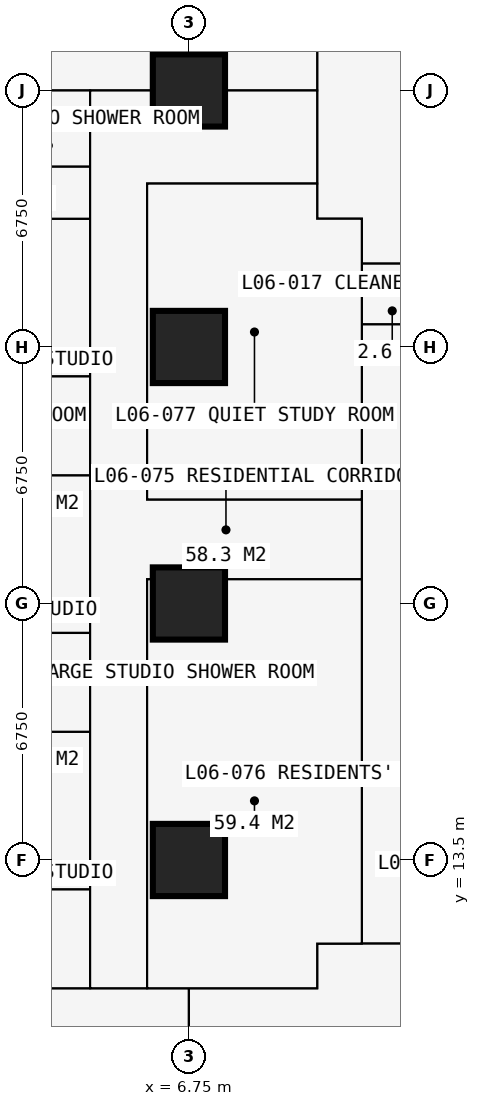
"""IFC4 building model, lengths in metres.
Left out: names, types, materials, properties, quantities, classifications, styles, units other than length and angle.
Written with IfcOpenShell. Run it as: python <this file> out.ifc"""

import sys

from ifc_helpers import new_model, si_unit, direction, frame, frame_2d, origin, origin_2d, place, context, subcontext, project, spatial, rectangle, extrude, element, fill, save


model = new_model("IFC4")
c1 = context("Model", 3, precision=1e-05, world=origin(), true_north=direction((0.0, 1.0)))
c2 = subcontext(c1, "Body", "Model", "MODEL_VIEW")
j1 = project(units=[si_unit("LENGTHUNIT", "METRE"), si_unit("PLANEANGLEUNIT", "RADIAN")], contexts=[c1])
p1 = place(None, origin())
s1 = spatial("IfcSite", under=j1, at=p1, CompositionType="ELEMENT")
p2 = place(p1, origin())
s2 = spatial("IfcBuilding", under=s1, at=p2, CompositionType="ELEMENT")
p3 = place(p2, frame((0.0, 0.0, 25.2)))
s3 = spatial("IfcBuildingStorey", under=s2, at=p3, CompositionType="ELEMENT", Elevation=25.2)
for number, where, z_axis, x_axis in (
    (1, (6.75, 13.5, 0.0), (0.0, 0.0, 1.0), (1.0, 0.0, 0.0)),
    (2, (6.75, 20.25, 0.0), (0.0, 0.0, 1.0), (1.0, 0.0, 0.0)),
    (3, (6.75, 27.0, 0.0), (0.0, 0.0, 1.0), (1.0, 0.0, 0.0)),
    (4, (6.75, 33.75, 0.0), (0.0, 0.0, 1.0), (1.0, 0.0, 0.0)),
):
    element("IfcColumn", number, at=place(p3, frame(where, z_axis=z_axis, x_axis=x_axis)), inside=s3, PredefinedType="COLUMN", context=c2, shape_type="SweptSolid", body=[
        extrude(rectangle(XDim=1.9, YDim=1.9, at=origin_2d()), origin(), (0.0, 0.0, 1.0), 3.6),
    ])
p4 = place(p3, frame((-0.734, 10.125, 0.0), z_axis=(0.0, 0.0, 1.0), x_axis=(1.0, 0.0, 0.0)))
e5 = element("IfcWall", 5, at=p4, inside=s3, PredefinedType="PARTITIONING", context=c2, shape_type="SweptSolid", body=[
    extrude(rectangle(XDim=10.859, YDim=0.15, at=frame_2d((5.429, 0.0))), origin(), (0.0, 0.0, 1.0), 3.375),
])
p5 = place(p4, frame((5.134, 0.0, 0.0)))
e6 = element("IfcOpeningElement", 6, at=p5, cuts=e5, PredefinedType="OPENING", context=c2, shape_type="SweptSolid", body=[
    extrude(rectangle(XDim=1.0, YDim=2.2, at=frame_2d((0.5, 1.1))), frame((0.0, 0.085, 0.0), z_axis=(0.0, -1.0, 0.0), x_axis=(1.0, 0.0, 0.0)), (0.0, 0.0, 1.0), 0.17),
])
p6 = place(p3, frame((-0.734, 16.875, 0.0), z_axis=(0.0, 0.0, 1.0), x_axis=(1.0, 0.0, 0.0)))
e7 = element("IfcWall", 7, at=p6, inside=s3, PredefinedType="PARTITIONING", context=c2, shape_type="SweptSolid", body=[
    extrude(rectangle(XDim=4.884, YDim=0.175, at=frame_2d((2.442, 0.0))), origin(), (0.0, 0.0, 1.0), 3.375),
])
p7 = place(p6, frame((3.234, 0.0, 0.0)))
e8 = element("IfcOpeningElement", 8, at=p7, cuts=e7, PredefinedType="OPENING", context=c2, shape_type="SweptSolid", body=[
    extrude(rectangle(XDim=0.9, YDim=2.2, at=frame_2d((0.45, 1.1))), frame((0.0, 0.097, 0.0), z_axis=(0.0, -1.0, 0.0), x_axis=(1.0, 0.0, 0.0)), (0.0, 0.0, 1.0), 0.195),
])
p8 = place(p3, frame((-0.734, 23.625, 0.0), z_axis=(0.0, 0.0, 1.0), x_axis=(1.0, 0.0, 0.0)))
e9 = element("IfcWall", 9, at=p8, inside=s3, PredefinedType="PARTITIONING", context=c2, shape_type="SweptSolid", body=[
    extrude(rectangle(XDim=4.884, YDim=0.175, at=frame_2d((2.442, 0.0))), origin(), (0.0, 0.0, 1.0), 3.375),
])
p9 = place(p8, frame((3.234, 0.0, 0.0)))
e10 = element("IfcOpeningElement", 10, at=p9, cuts=e9, PredefinedType="OPENING", context=c2, shape_type="SweptSolid", body=[
    extrude(rectangle(XDim=0.9, YDim=2.2, at=frame_2d((0.45, 1.1))), frame((0.0, 0.097, 0.0), z_axis=(0.0, -1.0, 0.0), x_axis=(1.0, 0.0, 0.0)), (0.0, 0.0, 1.0), 0.195),
])
p10 = place(p3, frame((-0.734, 30.375, 0.0), z_axis=(0.0, 0.0, 1.0), x_axis=(1.0, 0.0, 0.0)))
e11 = element("IfcWall", 11, at=p10, inside=s3, PredefinedType="PARTITIONING", context=c2, shape_type="SweptSolid", body=[
    extrude(rectangle(XDim=4.884, YDim=0.175, at=frame_2d((2.442, 0.0))), origin(), (0.0, 0.0, 1.0), 3.375),
])
p11 = place(p3, frame((-0.734, 33.75, 0.0), z_axis=(0.0, 0.0, 1.0), x_axis=(1.0, 0.0, 0.0)))
e12 = element("IfcWall", 12, at=p11, inside=s3, PredefinedType="PARTITIONING", context=c2, shape_type="SweptSolid", body=[
    extrude(rectangle(XDim=10.859, YDim=0.15, at=frame_2d((5.429, 0.0))), origin(), (0.0, 0.0, 1.0), 2.877),
])
for number, where, z_axis, x_axis in (
    (13, (1.75, 12.725, 0.0), (0.0, 0.0, 1.0), (1.0, 0.0, 0.0)),
    (14, (1.75, 19.475, 0.0), (0.0, 0.0, 1.0), (1.0, 0.0, 0.0)),
    (15, (1.75, 26.225, 0.0), (0.0, 0.0, 1.0), (1.0, 0.0, 0.0)),
):
    element("IfcWall", number, at=place(p3, frame(where, z_axis=z_axis, x_axis=x_axis)), inside=s3, PredefinedType="PARTITIONING", context=c2, shape_type="SweptSolid", body=[
        extrude(rectangle(XDim=2.4, YDim=0.1, at=frame_2d((1.2, 0.0))), origin(), (0.0, 0.0, 1.0), 3.375),
    ])
p12 = place(p3, frame((1.95, 31.75, 0.0), z_axis=(0.0, 0.0, 1.0), x_axis=(1.0, 0.0, 0.0)))
e16 = element("IfcWall", 16, at=p12, inside=s3, PredefinedType="PARTITIONING", context=c2, shape_type="SweptSolid", body=[
    extrude(rectangle(XDim=2.2, YDim=0.1, at=frame_2d((1.1, 0.0))), origin(), (0.0, 0.0, 1.0), 3.375),
])
p13 = place(p12, frame((0.65, 0.0, 0.0)))
e17 = element("IfcOpeningElement", 17, at=p13, cuts=e16, PredefinedType="OPENING", context=c2, shape_type="SweptSolid", body=[
    extrude(rectangle(XDim=0.9, YDim=2.2, at=frame_2d((0.45, 1.1))), frame((0.0, 0.06, 0.0), z_axis=(0.0, -1.0, 0.0), x_axis=(1.0, 0.0, 0.0)), (0.0, 0.0, 1.0), 0.12),
])
p14 = place(p3, frame((4.15, 10.125, 0.0), z_axis=(0.0, 0.0, 1.0), x_axis=(0.0, 1.0, 0.0)))
e18 = element("IfcWall", 18, at=p14, inside=s3, PredefinedType="PARTITIONING", context=c2, shape_type="SweptSolid", body=[
    extrude(rectangle(XDim=23.625, YDim=0.15, at=frame_2d((11.812, 0.0))), origin(), (0.0, 0.0, 1.0), 3.375),
])
p15 = place(p14, frame((4.2, 0.0, 0.0)))
e19 = element("IfcOpeningElement", 19, at=p15, cuts=e18, PredefinedType="OPENING", context=c2, shape_type="SweptSolid", body=[
    extrude(rectangle(XDim=0.95, YDim=2.2, at=frame_2d((0.475, 1.1))), frame((0.0, 0.085, 0.0), z_axis=(0.0, -1.0, 0.0), x_axis=(1.0, 0.0, 0.0)), (0.0, 0.0, 1.0), 0.17),
])
p16 = place(p14, frame((10.95, 0.0, 0.0)))
e20 = element("IfcOpeningElement", 20, at=p16, cuts=e18, PredefinedType="OPENING", context=c2, shape_type="SweptSolid", body=[
    extrude(rectangle(XDim=0.95, YDim=2.2, at=frame_2d((0.475, 1.1))), frame((0.0, 0.085, 0.0), z_axis=(0.0, -1.0, 0.0), x_axis=(1.0, 0.0, 0.0)), (0.0, 0.0, 1.0), 0.17),
])
p17 = place(p14, frame((17.7, 0.0, 0.0)))
e21 = element("IfcOpeningElement", 21, at=p17, cuts=e18, PredefinedType="OPENING", context=c2, shape_type="SweptSolid", body=[
    extrude(rectangle(XDim=0.95, YDim=2.2, at=frame_2d((0.475, 1.1))), frame((0.0, 0.085, 0.0), z_axis=(0.0, -1.0, 0.0), x_axis=(1.0, 0.0, 0.0)), (0.0, 0.0, 1.0), 0.17),
])
p18 = place(p14, frame((20.5, 0.0, 0.0)))
e22 = element("IfcOpeningElement", 22, at=p18, cuts=e18, PredefinedType="OPENING", context=c2, shape_type="SweptSolid", body=[
    extrude(rectangle(XDim=0.95, YDim=2.2, at=frame_2d((0.475, 1.1))), frame((0.0, 0.085, 0.0), z_axis=(0.0, -1.0, 0.0), x_axis=(1.0, 0.0, 0.0)), (0.0, 0.0, 1.0), 0.17),
])
p19 = place(p3, frame((5.65, 10.125, 0.0), z_axis=(0.0, 0.0, 1.0), x_axis=(0.0, 1.0, 0.0)))
e23 = element("IfcWall", 23, at=p19, inside=s3, PredefinedType="PARTITIONING", context=c2, shape_type="SweptSolid", body=[
    extrude(rectangle(XDim=10.762, YDim=0.15, at=frame_2d((5.381, 0.0))), origin(), (0.0, 0.0, 1.0), 3.375),
])
p20 = place(p19, frame((4.9, 0.0, 0.0)))
e24 = element("IfcOpeningElement", 24, at=p20, cuts=e23, PredefinedType="OPENING", context=c2, shape_type="SweptSolid", body=[
    extrude(rectangle(XDim=0.95, YDim=2.2, at=frame_2d((0.475, 1.1))), frame((0.0, 0.085, 0.0), z_axis=(0.0, -1.0, 0.0), x_axis=(1.0, 0.0, 0.0)), (0.0, 0.0, 1.0), 0.17),
])
p21 = place(p3, frame((5.65, 20.887, 0.0), z_axis=(0.0, 0.0, 1.0), x_axis=(1.0, 0.0, 0.0)))
e25 = element("IfcWall", 25, at=p21, inside=s3, PredefinedType="PARTITIONING", context=c2, shape_type="SweptSolid", body=[
    extrude(rectangle(XDim=5.65, YDim=0.15, at=frame_2d((2.825, 0.0))), origin(), (0.0, 0.0, 1.0), 3.375),
])
p22 = place(p3, frame((5.65, 22.988, 0.0), z_axis=(0.0, 0.0, 1.0), x_axis=(0.0, 1.0, 0.0)))
e26 = element("IfcWall", 26, at=p22, inside=s3, PredefinedType="PARTITIONING", context=c2, shape_type="SweptSolid", body=[
    extrude(rectangle(XDim=8.312, YDim=0.15, at=frame_2d((4.156, 0.0))), origin(), (0.0, 0.0, 1.0), 3.375),
])
p23 = place(p22, frame((5.0, 0.0, 0.0)))
e27 = element("IfcOpeningElement", 27, at=p23, cuts=e26, PredefinedType="OPENING", context=c2, shape_type="SweptSolid", body=[
    extrude(rectangle(XDim=0.95, YDim=2.2, at=frame_2d((0.475, 1.1))), frame((0.0, 0.085, 0.0), z_axis=(0.0, -1.0, 0.0), x_axis=(1.0, 0.0, 0.0)), (0.0, 0.0, 1.0), 0.17),
])
p24 = place(p3, frame((5.65, 22.988, 0.0), z_axis=(0.0, 0.0, 1.0), x_axis=(1.0, 0.0, 0.0)))
e28 = element("IfcWall", 28, at=p24, inside=s3, PredefinedType="PARTITIONING", context=c2, shape_type="SweptSolid", body=[
    extrude(rectangle(XDim=5.65, YDim=0.15, at=frame_2d((2.825, 0.0))), origin(), (0.0, 0.0, 1.0), 3.375),
])
p25 = place(p3, frame((5.65, 31.3, 0.0), z_axis=(0.0, 0.0, 1.0), x_axis=(1.0, 0.0, 0.0)))
e29 = element("IfcWall", 29, at=p25, inside=s3, PredefinedType="PARTITIONING", context=c2, shape_type="SweptSolid", body=[
    extrude(rectangle(XDim=4.475, YDim=0.15, at=frame_2d((2.238, 0.0))), origin(), (0.0, 0.0, 1.0), 3.375),
])
p26 = place(p3, frame((6.75, -0.734, 0.0), z_axis=(0.0, 0.0, 1.0), x_axis=(0.0, 1.0, 0.0)))
e30 = element("IfcWall", 30, at=p26, inside=s3, PredefinedType="PARTITIONING", context=c2, shape_type="SweptSolid", body=[
    extrude(rectangle(XDim=10.859, YDim=0.15, at=frame_2d((5.429, 0.0))), origin(), (0.0, 0.0, 1.0), 2.877),
])
p27 = place(p3, frame((10.125, 10.125, 0.0), z_axis=(0.0, 0.0, 1.0), x_axis=(0.0, 1.0, 0.0)))
e31 = element("IfcWall", 31, at=p27, inside=s3, PredefinedType="PARTITIONING", context=c2, shape_type="SweptSolid", body=[
    extrude(rectangle(XDim=1.175, YDim=0.15, at=frame_2d((0.587, 0.0))), origin(), (0.0, 0.0, 1.0), 3.375),
])
p28 = place(p3, frame((10.125, 11.3, 0.0), z_axis=(0.0, 0.0, 1.0), x_axis=(1.0, 0.0, 0.0)))
e32 = element("IfcWall", 32, at=p28, inside=s3, PredefinedType="PARTITIONING", context=c2, shape_type="SweptSolid", body=[
    extrude(rectangle(XDim=20.675, YDim=0.15, at=frame_2d((10.337, 0.0))), origin(), (0.0, 0.0, 1.0), 3.375),
])
p29 = place(p28, frame((1.775, 0.0, 0.0)))
e33 = element("IfcOpeningElement", 33, at=p29, cuts=e32, PredefinedType="OPENING", context=c2, shape_type="SweptSolid", body=[
    extrude(rectangle(XDim=1.0, YDim=2.2, at=frame_2d((0.5, 1.1))), frame((0.0, 0.085, 0.0), z_axis=(0.0, -1.0, 0.0), x_axis=(1.0, 0.0, 0.0)), (0.0, 0.0, 1.0), 0.17),
])
p30 = place(p28, frame((11.312, 0.0, 0.0)))
e34 = element("IfcOpeningElement", 34, at=p30, cuts=e32, PredefinedType="OPENING", context=c2, shape_type="SweptSolid", body=[
    extrude(rectangle(XDim=1.0, YDim=2.2, at=frame_2d((0.5, 1.1))), frame((0.0, 0.085, 0.0), z_axis=(0.0, -1.0, 0.0), x_axis=(1.0, 0.0, 0.0)), (0.0, 0.0, 1.0), 0.17),
])
p31 = place(p3, frame((10.125, 30.375, 0.0), z_axis=(0.0, 0.0, 1.0), x_axis=(0.0, 1.0, 0.0)))
e35 = element("IfcWall", 35, at=p31, inside=s3, PredefinedType="PARTITIONING", context=c2, shape_type="SweptSolid", body=[
    extrude(rectangle(XDim=10.859, YDim=0.15, at=frame_2d((5.429, 0.0))), origin(), (0.0, 0.0, 1.0), 3.375),
])
p32 = place(p31, frame((4.725, 0.0, 0.0)))
e36 = element("IfcOpeningElement", 36, at=p32, cuts=e35, PredefinedType="OPENING", context=c2, shape_type="SweptSolid", body=[
    extrude(rectangle(XDim=1.0, YDim=2.2, at=frame_2d((0.5, 1.1))), frame((0.0, 0.085, 0.0), z_axis=(0.0, -1.0, 0.0), x_axis=(1.0, 0.0, 0.0)), (0.0, 0.0, 1.0), 0.17),
])
p33 = place(p3, frame((10.125, 30.375, 0.0), z_axis=(0.0, 0.0, 1.0), x_axis=(1.0, 0.0, 0.0)))
e37 = element("IfcWall", 37, at=p33, inside=s3, PredefinedType="PARTITIONING", context=c2, shape_type="SweptSolid", body=[
    extrude(rectangle(XDim=1.175, YDim=0.15, at=frame_2d((0.587, 0.0))), origin(), (0.0, 0.0, 1.0), 3.375),
])
p34 = place(p3, frame((11.3, 11.3, 0.0), z_axis=(0.0, 0.0, 1.0), x_axis=(0.0, 1.0, 0.0)))
e38 = element("IfcWall", 38, at=p34, inside=s3, PredefinedType="PARTITIONING", context=c2, shape_type="SweptSolid", body=[
    extrude(rectangle(XDim=19.075, YDim=0.15, at=frame_2d((9.538, 0.0))), origin(), (0.0, 0.0, 1.0), 3.375),
])
p35 = place(p34, frame((10.137, 0.0, 0.0)))
e39 = element("IfcOpeningElement", 39, at=p35, cuts=e38, PredefinedType="OPENING", context=c2, shape_type="SweptSolid", body=[
    extrude(rectangle(XDim=1.0, YDim=2.2, at=frame_2d((0.5, 1.1))), frame((0.0, 0.085, 0.0), z_axis=(0.0, -1.0, 0.0), x_axis=(1.0, 0.0, 0.0)), (0.0, 0.0, 1.0), 0.17),
])
p36 = place(p3, frame((11.3, 27.6, 0.0), z_axis=(0.0, 0.0, 1.0), x_axis=(1.0, 0.0, 0.0)))
e40 = element("IfcWall", 40, at=p36, inside=s3, PredefinedType="PARTITIONING", context=c2, shape_type="SweptSolid", body=[
    extrude(rectangle(XDim=1.6, YDim=0.15, at=frame_2d((0.8, 0.0))), origin(), (0.0, 0.0, 1.0), 2.877),
])
p37 = place(p36, frame((0.3, 0.0, 0.0)))
e41 = element("IfcOpeningElement", 41, at=p37, cuts=e40, PredefinedType="OPENING", context=c2, shape_type="SweptSolid", body=[
    extrude(rectangle(XDim=0.95, YDim=2.2, at=frame_2d((0.475, 1.1))), frame((0.0, 0.085, 0.0), z_axis=(0.0, -1.0, 0.0), x_axis=(1.0, 0.0, 0.0)), (0.0, 0.0, 1.0), 0.17),
])
p38 = place(p3, frame((11.3, 29.2, 0.0), z_axis=(0.0, 0.0, 1.0), x_axis=(1.0, 0.0, 0.0)))
e42 = element("IfcWall", 42, at=p38, inside=s3, PredefinedType="PARTITIONING", context=c2, shape_type="SweptSolid", body=[
    extrude(rectangle(XDim=19.075, YDim=0.15, at=frame_2d((9.538, 0.0))), origin(), (0.0, 0.0, 1.0), 3.375),
])
p39 = place(p38, frame((12.875, 0.0, 0.0)))
e43 = element("IfcOpeningElement", 43, at=p39, cuts=e42, PredefinedType="OPENING", context=c2, shape_type="SweptSolid", body=[
    extrude(rectangle(XDim=1.0, YDim=2.2, at=frame_2d((0.5, 1.1))), frame((0.0, 0.085, 0.0), z_axis=(0.0, -1.0, 0.0), x_axis=(1.0, 0.0, 0.0)), (0.0, 0.0, 1.0), 0.17),
])
p40 = place(p38, frame((10.438, 0.0, 0.0)))
e44 = element("IfcOpeningElement", 44, at=p40, cuts=e42, PredefinedType="OPENING", context=c2, shape_type="SweptSolid", body=[
    extrude(rectangle(XDim=1.0, YDim=2.2, at=frame_2d((0.5, 1.1))), frame((0.0, 0.085, 0.0), z_axis=(0.0, -1.0, 0.0), x_axis=(1.0, 0.0, 0.0)), (0.0, 0.0, 1.0), 0.17),
])
p41 = place(p38, frame((15.675, 0.0, 0.0)))
e45 = element("IfcOpeningElement", 45, at=p41, cuts=e42, PredefinedType="OPENING", context=c2, shape_type="SweptSolid", body=[
    extrude(rectangle(XDim=0.95, YDim=2.2, at=frame_2d((0.475, 1.1))), frame((0.0, 0.085, 0.0), z_axis=(0.0, -1.0, 0.0), x_axis=(1.0, 0.0, 0.0)), (0.0, 0.0, 1.0), 0.17),
])
p42 = place(p37, origin())
e46 = element("IfcDoor", 46, at=p42, inside=s3, OperationType="SINGLE_SWING_LEFT", PredefinedType="DOOR", context=c2, shape_type="SweptSolid", body=[
    extrude(rectangle(XDim=0.95, YDim=2.2, at=frame_2d((0.475, 1.1))), frame((0.0, 0.025, 0.0), z_axis=(0.0, -1.0, 0.0), x_axis=(1.0, 0.0, 0.0)), (0.0, 0.0, 1.0), 0.05),
])
fill(e41, e46)
p43 = place(p5, origin())
e47 = element("IfcDoor", 47, at=p43, inside=s3, OperationType="SINGLE_SWING_LEFT", PredefinedType="DOOR", context=c2, shape_type="SweptSolid", body=[
    extrude(rectangle(XDim=1.0, YDim=2.2, at=frame_2d((0.5, 1.1))), frame((0.0, 0.025, 0.0), z_axis=(0.0, -1.0, 0.0), x_axis=(1.0, 0.0, 0.0)), (0.0, 0.0, 1.0), 0.05),
])
fill(e6, e47)
p44 = place(p29, origin())
e48 = element("IfcDoor", 48, at=p44, inside=s3, OperationType="SINGLE_SWING_LEFT", PredefinedType="DOOR", context=c2, shape_type="SweptSolid", body=[
    extrude(rectangle(XDim=1.0, YDim=2.2, at=frame_2d((0.5, 1.1))), frame((0.0, 0.025, 0.0), z_axis=(0.0, -1.0, 0.0), x_axis=(1.0, 0.0, 0.0)), (0.0, 0.0, 1.0), 0.05),
])
fill(e33, e48)
p45 = place(p15, origin())
e49 = element("IfcDoor", 49, at=p45, inside=s3, OperationType="SINGLE_SWING_LEFT", PredefinedType="DOOR", context=c2, shape_type="SweptSolid", body=[
    extrude(rectangle(XDim=0.95, YDim=2.2, at=frame_2d((0.475, 1.1))), frame((0.0, 0.025, 0.0), z_axis=(0.0, -1.0, 0.0), x_axis=(1.0, 0.0, 0.0)), (0.0, 0.0, 1.0), 0.05),
])
fill(e19, e49)
p46 = place(p16, origin())
e50 = element("IfcDoor", 50, at=p46, inside=s3, OperationType="SINGLE_SWING_LEFT", PredefinedType="DOOR", context=c2, shape_type="SweptSolid", body=[
    extrude(rectangle(XDim=0.95, YDim=2.2, at=frame_2d((0.475, 1.1))), frame((0.0, 0.025, 0.0), z_axis=(0.0, -1.0, 0.0), x_axis=(1.0, 0.0, 0.0)), (0.0, 0.0, 1.0), 0.05),
])
fill(e20, e50)
p47 = place(p7, origin())
e51 = element("IfcDoor", 51, at=p47, inside=s3, OperationType="SINGLE_SWING_RIGHT", PredefinedType="DOOR", context=c2, shape_type="SweptSolid", body=[
    extrude(rectangle(XDim=0.9, YDim=2.2, at=frame_2d((0.45, 1.1))), frame((0.0, 0.025, 0.0), z_axis=(0.0, -1.0, 0.0), x_axis=(1.0, 0.0, 0.0)), (0.0, 0.0, 1.0), 0.05),
])
fill(e8, e51)
p48 = place(p17, origin())
e52 = element("IfcDoor", 52, at=p48, inside=s3, OperationType="SINGLE_SWING_LEFT", PredefinedType="DOOR", context=c2, shape_type="SweptSolid", body=[
    extrude(rectangle(XDim=0.95, YDim=2.2, at=frame_2d((0.475, 1.1))), frame((0.0, 0.025, 0.0), z_axis=(0.0, -1.0, 0.0), x_axis=(1.0, 0.0, 0.0)), (0.0, 0.0, 1.0), 0.05),
])
fill(e21, e52)
p49 = place(p9, origin())
e53 = element("IfcDoor", 53, at=p49, inside=s3, OperationType="SINGLE_SWING_RIGHT", PredefinedType="DOOR", context=c2, shape_type="SweptSolid", body=[
    extrude(rectangle(XDim=0.9, YDim=2.2, at=frame_2d((0.45, 1.1))), frame((0.0, 0.025, 0.0), z_axis=(0.0, -1.0, 0.0), x_axis=(1.0, 0.0, 0.0)), (0.0, 0.0, 1.0), 0.05),
])
fill(e10, e53)
p50 = place(p18, origin())
e54 = element("IfcDoor", 54, at=p50, inside=s3, OperationType="SINGLE_SWING_LEFT", PredefinedType="DOOR", context=c2, shape_type="SweptSolid", body=[
    extrude(rectangle(XDim=0.95, YDim=2.2, at=frame_2d((0.475, 1.1))), frame((0.0, 0.025, 0.0), z_axis=(0.0, -1.0, 0.0), x_axis=(1.0, 0.0, 0.0)), (0.0, 0.0, 1.0), 0.05),
])
fill(e22, e54)
p51 = place(p13, origin())
e55 = element("IfcDoor", 55, at=p51, inside=s3, OperationType="SINGLE_SWING_RIGHT", PredefinedType="DOOR", context=c2, shape_type="SweptSolid", body=[
    extrude(rectangle(XDim=0.9, YDim=2.2, at=frame_2d((0.45, 1.1))), frame((0.0, 0.025, 0.0), z_axis=(0.0, -1.0, 0.0), x_axis=(1.0, 0.0, 0.0)), (0.0, 0.0, 1.0), 0.05),
])
fill(e17, e55)
p52 = place(p35, origin())
e56 = element("IfcDoor", 56, at=p52, inside=s3, OperationType="SINGLE_SWING_LEFT", PredefinedType="DOOR", context=c2, shape_type="SweptSolid", body=[
    extrude(rectangle(XDim=1.0, YDim=2.2, at=frame_2d((0.5, 1.1))), frame((0.0, 0.025, 0.0), z_axis=(0.0, -1.0, 0.0), x_axis=(1.0, 0.0, 0.0)), (0.0, 0.0, 1.0), 0.05),
])
fill(e39, e56)
p53 = place(p20, origin())
e57 = element("IfcDoor", 57, at=p53, inside=s3, OperationType="SINGLE_SWING_LEFT", PredefinedType="DOOR", context=c2, shape_type="SweptSolid", body=[
    extrude(rectangle(XDim=0.95, YDim=2.2, at=frame_2d((0.475, 1.1))), frame((0.0, 0.025, 0.0), z_axis=(0.0, -1.0, 0.0), x_axis=(1.0, 0.0, 0.0)), (0.0, 0.0, 1.0), 0.05),
])
fill(e24, e57)
p54 = place(p23, origin())
e58 = element("IfcDoor", 58, at=p54, inside=s3, OperationType="SINGLE_SWING_LEFT", PredefinedType="DOOR", context=c2, shape_type="SweptSolid", body=[
    extrude(rectangle(XDim=0.95, YDim=2.2, at=frame_2d((0.475, 1.1))), frame((0.0, 0.025, 0.0), z_axis=(0.0, -1.0, 0.0), x_axis=(1.0, 0.0, 0.0)), (0.0, 0.0, 1.0), 0.05),
])
fill(e27, e58)
save(model, sys.argv[1])
